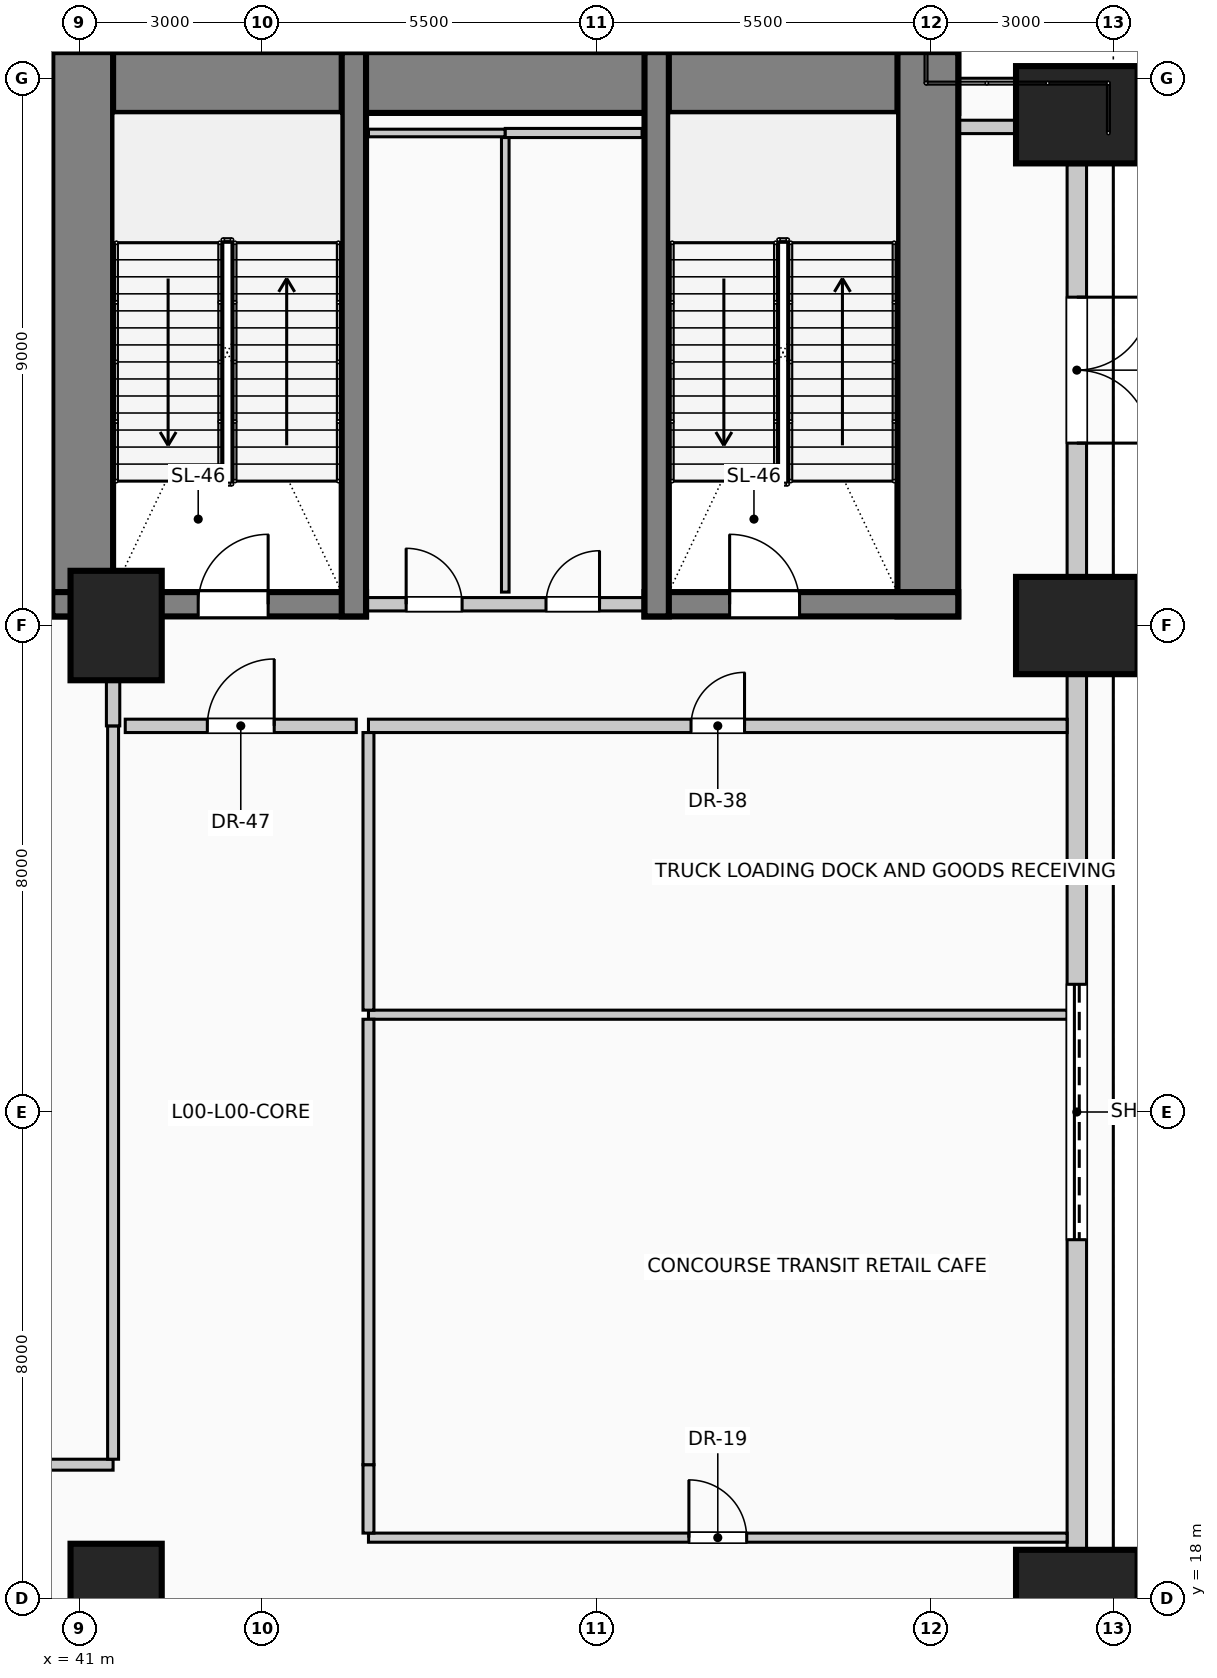
"""IFC4 building model, lengths in metres.
Left out: names, types, materials, properties, quantities, classifications, styles, units other than length and angle.
Written with IfcOpenShell. Run it as: python <this file> out.ifc"""

import sys

from ifc_helpers import new_model, si_unit, direction, frame, frame_2d, origin, origin_2d, place, context, subcontext, project, spatial, rectangle, extrude, element, fill, save


model = new_model("IFC4")
c1 = context("Model", 3, precision=1e-05, world=origin(), true_north=direction((0.0, 1.0)))
c2 = subcontext(c1, "Body", "Model", "MODEL_VIEW")
j1 = project(units=[si_unit("LENGTHUNIT", "METRE"), si_unit("PLANEANGLEUNIT", "RADIAN")], contexts=[c1])
p1 = place(None, origin())
s1 = spatial("IfcSite", under=j1, at=p1, CompositionType="ELEMENT")
p2 = place(p1, origin())
s2 = spatial("IfcBuilding", under=s1, at=p2, CompositionType="ELEMENT")
p3 = place(p2, origin())
s3 = spatial("IfcBuildingStorey", under=s2, at=p3, CompositionType="ELEMENT", Elevation=0.0)
p4 = place(p3, frame((40.55, 42.93, 0.0), z_axis=(0.0, 0.0, 1.0), x_axis=(1.0, 0.0, 0.0)))
e1 = element("IfcWall", 1, at=p4, inside=s3, PredefinedType="SHEAR", context=c2, shape_type="SweptSolid", body=[
    extrude(rectangle(XDim=14.9, YDim=1.0, at=frame_2d((7.45, 0.0))), origin(), (0.0, 0.0, 1.0), 5.4),
])
for number, where, z_axis, x_axis in (
    (2, (41.05, 34.15, 0.0), (0.0, 0.0, 1.0), (0.0, 1.0, 0.0)),
    (3, (54.95, 34.15, 0.0), (0.0, 0.0, 1.0), (0.0, 1.0, 0.0)),
):
    element("IfcWall", number, at=place(p3, frame(where, z_axis=z_axis, x_axis=x_axis)), inside=s3, PredefinedType="SHEAR", context=c2, shape_type="SweptSolid", body=[
        extrude(rectangle(XDim=9.28, YDim=1.0, at=frame_2d((4.64, 0.0))), origin(), (0.0, 0.0, 1.0), 5.4),
    ])
p5 = place(p3, frame((40.55, 34.35, 0.0), z_axis=(0.0, 0.0, 1.0), x_axis=(1.0, 0.0, 0.0)))
e4 = element("IfcWall", 4, at=p5, inside=s3, PredefinedType="SHEAR", context=c2, shape_type="SweptSolid", body=[
    extrude(rectangle(XDim=5.16, YDim=0.4, at=frame_2d((2.58, 0.0))), origin(), (0.0, 0.0, 1.0), 5.4),
])
p6 = place(p5, frame((2.4, 0.0, 0.0)))
e5 = element("IfcOpeningElement", 5, at=p6, cuts=e4, PredefinedType="OPENING", context=c2, shape_type="SweptSolid", body=[
    extrude(rectangle(XDim=1.15, YDim=2.2, at=frame_2d((0.575, 1.1))), frame((0.0, 0.21, 0.0), z_axis=(0.0, -1.0, 0.0), x_axis=(1.0, 0.0, 0.0)), (0.0, 0.0, 1.0), 0.42),
])
p7 = place(p3, frame((45.51, 34.15, 0.0), z_axis=(0.0, 0.0, 1.0), x_axis=(0.0, 1.0, 0.0)))
e6 = element("IfcWall", 6, at=p7, inside=s3, PredefinedType="SHEAR", context=c2, shape_type="SweptSolid", body=[
    extrude(rectangle(XDim=9.28, YDim=0.4, at=frame_2d((4.64, 0.0))), origin(), (0.0, 0.0, 1.0), 5.4),
])
p8 = place(p3, frame((50.29, 34.35, 0.0), z_axis=(0.0, 0.0, 1.0), x_axis=(1.0, 0.0, 0.0)))
e7 = element("IfcWall", 7, at=p8, inside=s3, PredefinedType="SHEAR", context=c2, shape_type="SweptSolid", body=[
    extrude(rectangle(XDim=5.16, YDim=0.4, at=frame_2d((2.58, 0.0))), origin(), (0.0, 0.0, 1.0), 5.4),
])
p9 = place(p8, frame((1.4, 0.0, 0.0)))
e8 = element("IfcOpeningElement", 8, at=p9, cuts=e7, PredefinedType="OPENING", context=c2, shape_type="SweptSolid", body=[
    extrude(rectangle(XDim=1.15, YDim=2.2, at=frame_2d((0.575, 1.1))), frame((0.0, 0.21, 0.0), z_axis=(0.0, -1.0, 0.0), x_axis=(1.0, 0.0, 0.0)), (0.0, 0.0, 1.0), 0.42),
])
p10 = place(p3, frame((50.49, 34.15, 0.0), z_axis=(0.0, 0.0, 1.0), x_axis=(0.0, 1.0, 0.0)))
e9 = element("IfcWall", 9, at=p10, inside=s3, PredefinedType="SHEAR", context=c2, shape_type="SweptSolid", body=[
    extrude(rectangle(XDim=9.28, YDim=0.4, at=frame_2d((4.64, 0.0))), origin(), (0.0, 0.0, 1.0), 5.4),
])
for number, where, z_axis, x_axis in (
    (10, (57.4, 18.0, 0.0), (0.0, 0.0, 1.0), (0.0, 1.0, 0.0)),
    (11, (57.4, 34.0, 0.0), (0.0, 0.0, 1.0), (0.0, 1.0, 0.0)),
    (12, (57.4, 42.4, 0.0), (0.0, 0.0, 1.0), (0.0, 1.0, 0.0)),
):
    element("IfcColumn", number, at=place(p3, frame(where, z_axis=z_axis, x_axis=x_axis)), inside=s3, PredefinedType="COLUMN", context=c2, shape_type="SweptSolid", body=[
        extrude(rectangle(XDim=1.6, YDim=2.0, at=origin_2d()), origin(), (0.0, 0.0, 1.0), 5.4),
    ])
for number, where, z_axis, x_axis in (
    (13, (41.6, 18.0, 0.0), (0.0, 0.0, 1.0), (1.0, 0.0, 0.0)),
    (14, (41.6, 34.0, 0.0), (0.0, 0.0, 1.0), (1.0, 0.0, 0.0)),
):
    element("IfcColumn", number, at=place(p3, frame(where, z_axis=z_axis, x_axis=x_axis)), inside=s3, PredefinedType="COLUMN", context=c2, shape_type="SweptSolid", body=[
        extrude(rectangle(XDim=1.5, YDim=1.8, at=origin_2d()), origin(), (0.0, 0.0, 1.0), 5.4),
    ])
p11 = place(p3, frame((57.4, 33.18, 0.0), z_axis=(0.0, 0.0, 1.0), x_axis=(0.0, -1.0, 0.0)))
e15 = element("IfcWall", 15, at=p11, inside=s3, PredefinedType="SOLIDWALL", context=c2, shape_type="SweptSolid", body=[
    extrude(rectangle(XDim=14.36, YDim=0.32, at=frame_2d((7.18, 0.0))), origin(), (0.0, 0.0, 1.0), 4.05),
])
p12 = place(p11, frame((5.08, 0.0, 0.0)))
e16 = element("IfcOpeningElement", 16, at=p12, cuts=e15, PredefinedType="OPENING", context=c2, shape_type="SweptSolid", body=[
    extrude(rectangle(XDim=4.2, YDim=3.4, at=frame_2d((2.1, 1.7))), frame((0.0, 0.17, 0.0), z_axis=(0.0, -1.0, 0.0), x_axis=(1.0, 0.0, 0.0)), (0.0, 0.0, 1.0), 0.34),
])
p13 = place(p3, frame((57.4, 41.58, 0.0), z_axis=(0.0, 0.0, 1.0), x_axis=(0.0, -1.0, 0.0)))
e17 = element("IfcWall", 17, at=p13, inside=s3, PredefinedType="SOLIDWALL", context=c2, shape_type="SweptSolid", body=[
    extrude(rectangle(XDim=6.76, YDim=0.32, at=frame_2d((3.38, 0.0))), origin(), (0.0, 0.0, 1.0), 4.05),
])
p14 = place(p13, frame((2.18, 0.0, 0.0)))
e18 = element("IfcOpeningElement", 18, at=p14, cuts=e17, PredefinedType="OPENING", context=c2, shape_type="SweptSolid", body=[
    extrude(rectangle(XDim=2.4, YDim=2.6, at=frame_2d((1.2, 1.3))), frame((0.0, 0.17, 0.0), z_axis=(0.0, -1.0, 0.0), x_axis=(1.0, 0.0, 0.0)), (0.0, 0.0, 1.0), 0.34),
])
p15 = place(p3, frame((41.75, 32.35, 0.0), z_axis=(0.0, 0.0, 1.0), x_axis=(1.0, 0.0, 0.0)))
e19 = element("IfcWall", 19, at=p15, inside=s3, PredefinedType="PARTITIONING", context=c2, shape_type="SweptSolid", body=[
    extrude(rectangle(XDim=3.8, YDim=0.22, at=frame_2d((1.9, 0.0))), origin(), (0.0, 0.0, 1.0), 5.0),
])
p16 = place(p15, frame((1.35, 0.0, 0.0)))
e20 = element("IfcOpeningElement", 20, at=p16, cuts=e19, PredefinedType="OPENING", context=c2, shape_type="SweptSolid", body=[
    extrude(rectangle(XDim=1.1, YDim=2.2, at=frame_2d((0.55, 1.1))), frame((0.0, 0.12, 0.0), z_axis=(0.0, -1.0, 0.0), x_axis=(1.0, 0.0, 0.0)), (0.0, 0.0, 1.0), 0.24),
])
p17 = place(p3, frame((45.72, 34.35, 0.0), z_axis=(0.0, 0.0, 1.0), x_axis=(1.0, 0.0, 0.0)))
e21 = element("IfcWall", 21, at=p17, inside=s3, PredefinedType="PARTITIONING", context=c2, shape_type="SweptSolid", body=[
    extrude(rectangle(XDim=4.56, YDim=0.22, at=frame_2d((2.28, 0.0))), origin(), (0.0, 0.0, 1.0), 4.045),
])
p18 = place(p17, frame((0.65, 0.0, 0.0)))
e22 = element("IfcOpeningElement", 22, at=p18, cuts=e21, PredefinedType="OPENING", context=c2, shape_type="SweptSolid", body=[
    extrude(rectangle(XDim=0.92, YDim=2.1, at=frame_2d((0.46, 1.05))), frame((0.0, 0.12, 0.0), z_axis=(0.0, -1.0, 0.0), x_axis=(1.0, 0.0, 0.0)), (0.0, 0.0, 1.0), 0.24),
])
p19 = place(p17, frame((2.95, 0.0, 0.0)))
e23 = element("IfcOpeningElement", 23, at=p19, cuts=e21, PredefinedType="OPENING", context=c2, shape_type="SweptSolid", body=[
    extrude(rectangle(XDim=0.88, YDim=2.1, at=frame_2d((0.44, 1.05))), frame((0.0, 0.12, 0.0), z_axis=(0.0, -1.0, 0.0), x_axis=(1.0, 0.0, 0.0)), (0.0, 0.0, 1.0), 0.24),
])
p20 = place(p3, frame((45.75, 19.0, 0.0), z_axis=(0.0, 0.0, 1.0), x_axis=(1.0, 0.0, 0.0)))
e24 = element("IfcWall", 24, at=p20, inside=s3, PredefinedType="PARTITIONING", context=c2, shape_type="SweptSolid", body=[
    extrude(rectangle(XDim=11.49, YDim=0.15, at=frame_2d((5.745, 0.0))), origin(), (0.0, 0.0, 1.0), 5.0),
])
p21 = place(p20, frame((5.27, 0.0, 0.0)))
e25 = element("IfcOpeningElement", 25, at=p21, cuts=e24, PredefinedType="OPENING", context=c2, shape_type="SweptSolid", body=[
    extrude(rectangle(XDim=0.95, YDim=2.15, at=frame_2d((0.475, 1.075))), frame((0.0, 0.085, 0.0), z_axis=(0.0, -1.0, 0.0), x_axis=(1.0, 0.0, 0.0)), (0.0, 0.0, 1.0), 0.17),
])
p22 = place(p3, frame((15.85, 20.2, 0.0), z_axis=(0.0, 0.0, 1.0), x_axis=(1.0, 0.0, 0.0)))
e26 = element("IfcWall", 26, at=p22, inside=s3, PredefinedType="PARTITIONING", context=c2, shape_type="SweptSolid", body=[
    extrude(rectangle(XDim=25.7, YDim=0.18, at=frame_2d((12.85, 0.0))), origin(), (0.0, 0.0, 1.0), 5.0),
])
p23 = place(p22, frame((11.115, 0.0, 0.0)))
e27 = element("IfcOpeningElement", 27, at=p23, cuts=e26, PredefinedType="OPENING", context=c2, shape_type="SweptSolid", body=[
    extrude(rectangle(XDim=0.95, YDim=2.15, at=frame_2d((0.475, 1.075))), frame((0.0, 0.1, 0.0), z_axis=(0.0, -1.0, 0.0), x_axis=(1.0, 0.0, 0.0)), (0.0, 0.0, 1.0), 0.2),
])
p24 = place(p3, frame((45.75, 27.6, 0.0), z_axis=(0.0, 0.0, 1.0), x_axis=(1.0, 0.0, 0.0)))
e28 = element("IfcWall", 28, at=p24, inside=s3, PredefinedType="PARTITIONING", context=c2, shape_type="SweptSolid", body=[
    extrude(rectangle(XDim=11.49, YDim=0.15, at=frame_2d((5.745, 0.0))), origin(), (0.0, 0.0, 1.0), 5.0),
])
p25 = place(p3, frame((45.75, 32.35, 0.0), z_axis=(0.0, 0.0, 1.0), x_axis=(1.0, 0.0, 0.0)))
e29 = element("IfcWall", 29, at=p25, inside=s3, PredefinedType="PARTITIONING", context=c2, shape_type="SweptSolid", body=[
    extrude(rectangle(XDim=11.49, YDim=0.22, at=frame_2d((5.745, 0.0))), origin(), (0.0, 0.0, 1.0), 5.0),
])
p26 = place(p25, frame((5.305, 0.0, 0.0)))
e30 = element("IfcOpeningElement", 30, at=p26, cuts=e29, PredefinedType="OPENING", context=c2, shape_type="SweptSolid", body=[
    extrude(rectangle(XDim=0.88, YDim=2.1, at=frame_2d((0.44, 1.05))), frame((0.0, 0.12, 0.0), z_axis=(0.0, -1.0, 0.0), x_axis=(1.0, 0.0, 0.0)), (0.0, 0.0, 1.0), 0.24),
])
p27 = place(p3, frame((45.75, 42.1, 0.0), z_axis=(0.0, 0.0, 1.0), x_axis=(1.0, 0.0, 0.0)))
e31 = element("IfcWall", 31, at=p27, inside=s3, PredefinedType="PARTITIONING", context=c2, shape_type="SweptSolid", body=[
    extrude(rectangle(XDim=2.25, YDim=0.125, at=frame_2d((1.125, 0.0))), origin(), (0.0, 0.0, 1.0), 5.0),
])
p28 = place(p3, frame((48.0, 42.1, 0.0), z_axis=(0.0, 0.0, 1.0), x_axis=(1.0, 0.0, 0.0)))
e32 = element("IfcWall", 32, at=p28, inside=s3, PredefinedType="PARTITIONING", context=c2, shape_type="SweptSolid", body=[
    extrude(rectangle(XDim=2.25, YDim=0.15, at=frame_2d((1.125, 0.0))), origin(), (0.0, 0.0, 1.0), 5.0),
])
p29 = place(p3, frame((55.45, 42.2, 0.0), z_axis=(0.0, 0.0, 1.0), x_axis=(1.0, 0.0, 0.0)))
e33 = element("IfcWall", 33, at=p29, inside=s3, PredefinedType="PARTITIONING", context=c2, shape_type="SweptSolid", body=[
    extrude(rectangle(XDim=0.95, YDim=0.22, at=frame_2d((0.475, 0.0))), origin(), (0.0, 0.0, 1.0), 5.0),
])
p30 = place(p3, frame((41.55, 20.29, 0.0), z_axis=(0.0, 0.0, 1.0), x_axis=(0.0, 1.0, 0.0)))
e34 = element("IfcWall", 34, at=p30, inside=s3, PredefinedType="PARTITIONING", context=c2, shape_type="SweptSolid", body=[
    extrude(rectangle(XDim=12.06, YDim=0.18, at=frame_2d((6.03, 0.0))), origin(), (0.0, 0.0, 1.0), 4.045),
])
p31 = place(p3, frame((41.55, 32.35, 0.0), z_axis=(0.0, 0.0, 1.0), x_axis=(0.0, 1.0, 0.0)))
e35 = element("IfcWall", 35, at=p31, inside=s3, PredefinedType="PARTITIONING", context=c2, shape_type="SweptSolid", body=[
    extrude(rectangle(XDim=0.75, YDim=0.22, at=frame_2d((0.375, 0.0))), origin(), (0.0, 0.0, 1.0), 4.045),
])
p32 = place(p3, frame((41.55, 43.43, 0.0), z_axis=(0.0, 0.0, 1.0), x_axis=(0.0, 1.0, 0.0)))
e36 = element("IfcWall", 36, at=p32, inside=s3, PredefinedType="PARTITIONING", context=c2, shape_type="SweptSolid", body=[
    extrude(rectangle(XDim=0.97, YDim=0.22, at=frame_2d((0.485, 0.0))), origin(), (0.0, 0.0, 1.0), 5.0),
])
p33 = place(p3, frame((45.75, 19.075, 0.0), z_axis=(0.0, 0.0, 1.0), x_axis=(0.0, 1.0, 0.0)))
e37 = element("IfcWall", 37, at=p33, inside=s3, PredefinedType="PARTITIONING", context=c2, shape_type="SweptSolid", body=[
    extrude(rectangle(XDim=1.125, YDim=0.18, at=frame_2d((0.562, 0.0))), origin(), (0.0, 0.0, 1.0), 5.0),
])
p34 = place(p3, frame((45.75, 20.2, 0.0), z_axis=(0.0, 0.0, 1.0), x_axis=(0.0, 1.0, 0.0)))
e38 = element("IfcWall", 38, at=p34, inside=s3, PredefinedType="PARTITIONING", context=c2, shape_type="SweptSolid", body=[
    extrude(rectangle(XDim=7.325, YDim=0.18, at=frame_2d((3.663, 0.0))), origin(), (0.0, 0.0, 1.0), 5.0),
])
p35 = place(p3, frame((45.75, 27.675, 0.0), z_axis=(0.0, 0.0, 1.0), x_axis=(0.0, 1.0, 0.0)))
e39 = element("IfcWall", 39, at=p35, inside=s3, PredefinedType="PARTITIONING", context=c2, shape_type="SweptSolid", body=[
    extrude(rectangle(XDim=4.565, YDim=0.18, at=frame_2d((2.282, 0.0))), origin(), (0.0, 0.0, 1.0), 5.0),
])
p36 = place(p3, frame((48.0, 34.55, 0.0), z_axis=(0.0, 0.0, 1.0), x_axis=(0.0, 1.0, 0.0)))
e40 = element("IfcWall", 40, at=p36, inside=s3, PredefinedType="PARTITIONING", context=c2, shape_type="SweptSolid", body=[
    extrude(rectangle(XDim=7.475, YDim=0.125, at=frame_2d((3.737, 0.0))), origin(), (0.0, 0.0, 1.0), 5.0),
])
p37 = place(p12, origin())
e41 = element("IfcDoor", 41, at=p37, inside=s3, OperationType="ROLLINGUP", PredefinedType="GATE", context=c2, shape_type="SweptSolid", body=[
    extrude(rectangle(XDim=4.2, YDim=3.4, at=frame_2d((2.1, 1.7))), frame((0.0, 0.025, 0.0), z_axis=(0.0, -1.0, 0.0), x_axis=(1.0, 0.0, 0.0)), (0.0, 0.0, 1.0), 0.05),
])
fill(e16, e41)
p38 = place(p14, origin())
e42 = element("IfcDoor", 42, at=p38, inside=s3, OperationType="DOUBLE_DOOR_SINGLE_SWING", PredefinedType="DOOR", context=c2, shape_type="SweptSolid", body=[
    extrude(rectangle(XDim=2.4, YDim=2.6, at=frame_2d((1.2, 1.3))), frame((0.0, 0.025, 0.0), z_axis=(0.0, -1.0, 0.0), x_axis=(1.0, 0.0, 0.0)), (0.0, 0.0, 1.0), 0.05),
])
fill(e18, e42)
p39 = place(p16, origin())
e43 = element("IfcDoor", 43, at=p39, inside=s3, OperationType="SINGLE_SWING_RIGHT", PredefinedType="DOOR", context=c2, shape_type="SweptSolid", body=[
    extrude(rectangle(XDim=1.1, YDim=2.2, at=frame_2d((0.55, 1.1))), frame((0.0, 0.025, 0.0), z_axis=(0.0, -1.0, 0.0), x_axis=(1.0, 0.0, 0.0)), (0.0, 0.0, 1.0), 0.05),
])
fill(e20, e43)
p40 = place(p6, origin())
e44 = element("IfcDoor", 44, at=p40, inside=s3, OperationType="SINGLE_SWING_RIGHT", PredefinedType="DOOR", context=c2, shape_type="SweptSolid", body=[
    extrude(rectangle(XDim=1.15, YDim=2.2, at=frame_2d((0.575, 1.1))), frame((0.0, 0.025, 0.0), z_axis=(0.0, -1.0, 0.0), x_axis=(1.0, 0.0, 0.0)), (0.0, 0.0, 1.0), 0.05),
])
fill(e5, e44)
p41 = place(p18, origin())
e45 = element("IfcDoor", 45, at=p41, inside=s3, OperationType="SINGLE_SWING_LEFT", PredefinedType="DOOR", context=c2, shape_type="SweptSolid", body=[
    extrude(rectangle(XDim=0.92, YDim=2.1, at=frame_2d((0.46, 1.05))), frame((0.0, 0.025, 0.0), z_axis=(0.0, -1.0, 0.0), x_axis=(1.0, 0.0, 0.0)), (0.0, 0.0, 1.0), 0.05),
])
fill(e22, e45)
p42 = place(p19, origin())
e46 = element("IfcDoor", 46, at=p42, inside=s3, OperationType="SINGLE_SWING_RIGHT", PredefinedType="DOOR", context=c2, shape_type="SweptSolid", body=[
    extrude(rectangle(XDim=0.88, YDim=2.1, at=frame_2d((0.44, 1.05))), frame((0.0, 0.025, 0.0), z_axis=(0.0, -1.0, 0.0), x_axis=(1.0, 0.0, 0.0)), (0.0, 0.0, 1.0), 0.05),
])
fill(e23, e46)
p43 = place(p9, origin())
e47 = element("IfcDoor", 47, at=p43, inside=s3, OperationType="SINGLE_SWING_LEFT", PredefinedType="DOOR", context=c2, shape_type="SweptSolid", body=[
    extrude(rectangle(XDim=1.15, YDim=2.2, at=frame_2d((0.575, 1.1))), frame((0.0, 0.025, 0.0), z_axis=(0.0, -1.0, 0.0), x_axis=(1.0, 0.0, 0.0)), (0.0, 0.0, 1.0), 0.05),
])
fill(e8, e47)
p44 = place(p21, origin())
e48 = element("IfcDoor", 48, at=p44, inside=s3, OperationType="SINGLE_SWING_LEFT", PredefinedType="DOOR", context=c2, shape_type="SweptSolid", body=[
    extrude(rectangle(XDim=0.95, YDim=2.15, at=frame_2d((0.475, 1.075))), frame((0.0, 0.025, 0.0), z_axis=(0.0, -1.0, 0.0), x_axis=(1.0, 0.0, 0.0)), (0.0, 0.0, 1.0), 0.05),
])
fill(e25, e48)
p45 = place(p26, origin())
e49 = element("IfcDoor", 49, at=p45, inside=s3, OperationType="SINGLE_SWING_RIGHT", PredefinedType="DOOR", context=c2, shape_type="SweptSolid", body=[
    extrude(rectangle(XDim=0.88, YDim=2.1, at=frame_2d((0.44, 1.05))), frame((0.0, 0.025, 0.0), z_axis=(0.0, -1.0, 0.0), x_axis=(1.0, 0.0, 0.0)), (0.0, 0.0, 1.0), 0.05),
])
fill(e30, e49)
save(model, sys.argv[1])
